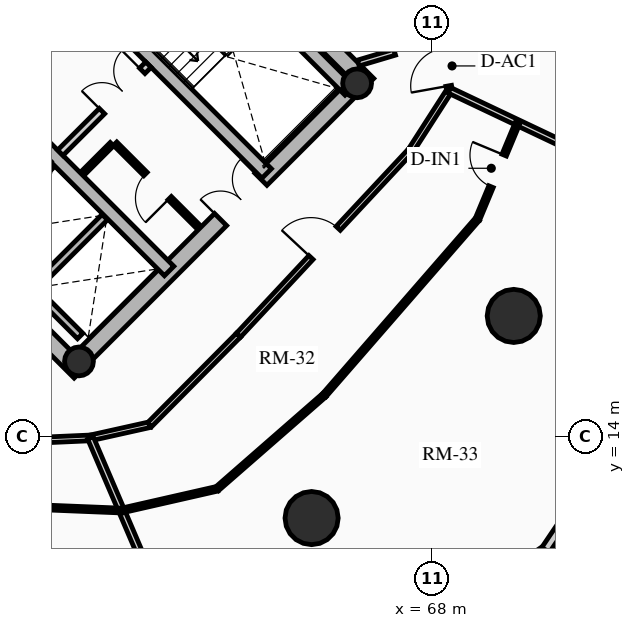
"""IFC4 building model, lengths in metres.
Left out: names, types, materials, properties, quantities, classifications, styles, units other than length and angle.
Written with IfcOpenShell. Run it as: python <this file> out.ifc"""

import sys

from ifc_helpers import new_model, si_unit, direction, frame, frame_2d, origin, origin_2d, place, context, subcontext, project, spatial, rectangle, circle, hollow_circle, extrude, source, transform, mapped, element, fill, save


model = new_model("IFC4")
c1 = context("Model", 3, precision=1e-05, world=origin(), true_north=direction((0.0, 1.0)))
c2 = subcontext(c1, "Body", "Model", "MODEL_VIEW")
j1 = project(units=[si_unit("LENGTHUNIT", "METRE"), si_unit("PLANEANGLEUNIT", "RADIAN")], contexts=[c1])
p1 = place(None, origin())
s1 = spatial("IfcSite", under=j1, at=p1, CompositionType="ELEMENT")
p2 = place(p1, origin())
s2 = spatial("IfcBuilding", under=s1, at=p2, CompositionType="ELEMENT")
p3 = place(p2, frame((0.0, 0.0, 105.07)))
s3 = spatial("IfcBuildingStorey", under=s2, at=p3, CompositionType="ELEMENT", Elevation=105.07)
for number, where, z_axis, x_axis in (
    (1, (58.737, 15.697, 0.0), (0.0, 0.0, 1.0), (-0.707, 0.707, 0.0)),
    (2, (66.303, 23.263, 0.0), (0.0, 0.0, 1.0), (-0.707, 0.707, 0.0)),
):
    element("IfcWall", number, at=place(p3, frame(where, z_axis=z_axis, x_axis=x_axis)), inside=s3, PredefinedType="SHEAR", context=c2, shape_type="SweptSolid", body=[
        extrude(rectangle(XDim=14.2, YDim=0.45, at=frame_2d((7.1, 0.0))), origin(), (0.0, 0.0, 1.0), 2.91),
    ])
p4 = place(p3, frame((58.578, 15.856, 0.0), z_axis=(0.0, 0.0, 1.0), x_axis=(0.707106781187, 0.707106781187, 0.0)))
e3 = element("IfcWall", 3, at=p4, inside=s3, PredefinedType="SHEAR", context=c2, shape_type="SweptSolid", body=[
    extrude(rectangle(XDim=10.7, YDim=0.45, at=frame_2d((5.35, 0.0))), origin(), (0.0, 0.0, 1.0), 2.91),
])
m1 = source(origin(), c2, "Body", "SweptSolid", [
    extrude(rectangle(XDim=1.5, YDim=2.02, at=frame_2d((0.75, 1.01))), frame((0.0, 0.235, 0.0), z_axis=(0.0, -1.0, 0.0), x_axis=(1.0, 0.0, 0.0)), (0.0, 0.0, 1.0), 0.47),
])
p5 = place(p4, frame((5.45, 0.0, 0.0)))
e4 = element("IfcOpeningElement", 4, at=p5, cuts=e3, PredefinedType="OPENING", context=c2, shape_type="MappedRepresentation", body=[
    mapped(m1, transform((0.0, 0.0, 0.0), x_axis=(1.0, 0.0, 0.0), y_axis=(0.0, 1.0, 0.0), z_axis=(0.0, 0.0, 1.0), scale=1.0)),
])
p6 = place(p3, frame((61.078, 18.355, 0.0), z_axis=(0.0, 0.0, 1.0), x_axis=(-0.707106781187, 0.707106781187, 0.0)))
e5 = element("IfcWall", 5, at=p6, inside=s3, PredefinedType="SHEAR", context=c2, shape_type="SweptSolid", body=[
    extrude(rectangle(XDim=13.75, YDim=0.35, at=frame_2d((6.875, 0.0))), origin(), (0.0, 0.0, 1.0), 2.91),
])
m2 = source(origin(), c2, "Body", "SweptSolid", [
    extrude(rectangle(XDim=1.1, YDim=2.015, at=frame_2d((0.55, 1.007))), frame((0.0, 0.185, 0.0), z_axis=(0.0, -1.0, 0.0), x_axis=(1.0, 0.0, 0.0)), (0.0, 0.0, 1.0), 0.37),
])
p7 = place(p6, frame((4.875, 0.0, 0.0)))
e6 = element("IfcOpeningElement", 6, at=p7, cuts=e5, PredefinedType="OPENING", context=c2, shape_type="MappedRepresentation", body=[
    mapped(m2, transform((0.0, 0.0, 0.0), x_axis=(1.0, 0.0, 0.0), y_axis=(0.0, 1.0, 0.0), z_axis=(0.0, 0.0, 1.0), scale=1.0)),
])
m3 = source(origin(), c2, "Body", "SweptSolid", [
    extrude(rectangle(XDim=1.15, YDim=2.02, at=frame_2d((0.575, 1.01))), frame((0.0, 0.185, 0.0), z_axis=(0.0, -1.0, 0.0), x_axis=(1.0, 0.0, 0.0)), (0.0, 0.0, 1.0), 0.37),
])
p8 = place(p6, frame((7.295, 0.0, 0.0)))
e7 = element("IfcOpeningElement", 7, at=p8, cuts=e5, PredefinedType="OPENING", context=c2, shape_type="MappedRepresentation", body=[
    mapped(m3, transform((0.0, 0.0, 0.0), x_axis=(1.0, 0.0, 0.0), y_axis=(0.0, 1.0, 0.0), z_axis=(0.0, 0.0, 1.0), scale=1.0)),
])
p9 = place(p3, frame((63.645, 20.922, 0.0), z_axis=(0.0, 0.0, 1.0), x_axis=(-0.707106781187, 0.707106781187, 0.0)))
e8 = element("IfcWall", 8, at=p9, inside=s3, PredefinedType="SHEAR", context=c2, shape_type="SweptSolid", body=[
    extrude(rectangle(XDim=13.75, YDim=0.35, at=frame_2d((6.875, 0.0))), origin(), (0.0, 0.0, 1.0), 2.91),
])
p10 = place(p9, frame((10.0, 0.0, 0.0)))
e9 = element("IfcOpeningElement", 9, at=p10, cuts=e8, PredefinedType="OPENING", context=c2, shape_type="MappedRepresentation", body=[
    mapped(m2, transform((0.0, 0.0, 0.0), x_axis=(1.0, 0.0, 0.0), y_axis=(0.0, 1.0, 0.0), z_axis=(0.0, 0.0, 1.0), scale=1.0)),
])
p11 = place(p9, frame((12.0, 0.0, 0.0)))
e10 = element("IfcOpeningElement", 10, at=p11, cuts=e8, PredefinedType="OPENING", context=c2, shape_type="MappedRepresentation", body=[
    mapped(m2, transform((0.0, 0.0, 0.0), x_axis=(1.0, 0.0, 0.0), y_axis=(0.0, 1.0, 0.0), z_axis=(0.0, 0.0, 1.0), scale=1.0)),
])
p12 = place(p9, frame((5.305, 0.0, 0.0)))
e11 = element("IfcOpeningElement", 11, at=p12, cuts=e8, PredefinedType="OPENING", context=c2, shape_type="MappedRepresentation", body=[
    mapped(m3, transform((0.0, 0.0, 0.0), x_axis=(1.0, 0.0, 0.0), y_axis=(0.0, 1.0, 0.0), z_axis=(0.0, 0.0, 1.0), scale=1.0)),
])
p13 = place(p3, frame((65.83, 23.107, 0.0), z_axis=(0.0, 0.0, 1.0), x_axis=(-0.707088616009, 0.707124945897, 0.0)))
e12 = element("IfcWall", 12, at=p13, inside=s3, PredefinedType="SHEAR", context=c2, shape_type="SweptSolid", body=[
    extrude(rectangle(XDim=6.72, YDim=0.35, at=frame_2d((3.36, 0.0))), origin(), (0.0, 0.0, 1.0), 2.91),
])
for number, where, z_axis, x_axis in (
    (13, (58.706, 15.976, 0.0), (0.0, 0.0, 1.0), (0.707, 0.707, 0.0)),
    (14, (66.024, 23.294, 0.0), (0.0, 0.0, 1.0), (0.707, 0.707, 0.0)),
):
    element("IfcColumn", number, at=place(p3, frame(where, z_axis=z_axis, x_axis=x_axis)), inside=s3, PredefinedType="COLUMN", context=c2, shape_type="SweptSolid", body=[
        extrude(hollow_circle(Radius=0.38, WallThickness=0.032, at=origin_2d()), origin(), (0.0, 0.0, 1.0), 2.91),
    ])
for number, where, z_axis, x_axis in (
    (15, (64.827, 11.854, 0.0), (0.0, 0.0, 1.0), (1.0, 0.0, 0.0)),
    (16, (70.146, 17.173, 0.0), (0.0, 0.0, 1.0), (1.0, 0.0, 0.0)),
):
    element("IfcColumn", number, at=place(p3, frame(where, z_axis=z_axis, x_axis=x_axis)), inside=s3, PredefinedType="USERDEFINED", context=c2, shape_type="SweptSolid", body=[
        extrude(circle(Radius=0.7, at=origin_2d()), origin(), (0.0, 0.0, 1.0), 2.91),
    ])
p14 = place(p3, frame((70.985, 11.015, 0.0), z_axis=(0.0, 0.0, 1.0), x_axis=(-0.828781148131, -0.559572880421, 0.0)))
e17 = element("IfcWall", 17, at=p14, inside=s3, PredefinedType="SOLIDWALL", context=c2, shape_type="SweptSolid", body=[
    extrude(rectangle(XDim=4.905, YDim=0.24, at=frame_2d((2.452, 0.0))), origin(), (0.0, 0.0, 1.0), 2.179),
])
p15 = place(p3, frame((73.729, 15.08, 0.0), z_axis=(0.0, 0.0, 1.0), x_axis=(-0.559572880421, -0.828781148131, 0.0)))
e18 = element("IfcWall", 18, at=p15, inside=s3, PredefinedType="SOLIDWALL", context=c2, shape_type="SweptSolid", body=[
    extrude(rectangle(XDim=4.905, YDim=0.24, at=frame_2d((2.452, 0.0))), origin(), (0.0, 0.0, 1.0), 2.179),
])
m4 = source(origin(), c2, "Body", "SweptSolid", [
    extrude(rectangle(XDim=2.2, YDim=1.35, at=frame_2d((1.1, 0.675))), frame((0.0, 0.13, 0.0), z_axis=(0.0, -1.0, 0.0), x_axis=(1.0, 0.0, 0.0)), (0.0, 0.0, 1.0), 0.26),
])
p16 = place(p15, frame((1.352, 0.0, 0.65)))
e19 = element("IfcOpeningElement", 19, at=p16, cuts=e18, PredefinedType="OPENING", context=c2, shape_type="MappedRepresentation", body=[
    mapped(m4, transform((0.0, 0.0, 0.0), x_axis=(1.0, 0.0, 0.0), y_axis=(0.0, 1.0, 0.0), z_axis=(0.0, 0.0, 1.0), scale=1.0)),
])
p17 = place(p3, frame((55.888, 19.069, 0.0), z_axis=(0.0, 0.0, 1.0), x_axis=(0.707106781187, 0.707106781187, 0.0)))
e20 = element("IfcWall", 20, at=p17, inside=s3, PredefinedType="SHEAR", context=c2, shape_type="SweptSolid", body=[
    extrude(rectangle(XDim=2.97, YDim=0.2, at=frame_2d((1.485, 0.0))), origin(), (0.0, 0.0, 1.0), 2.91),
])
p18 = place(p3, frame((57.284, 17.673, 0.0), z_axis=(0.0, 0.0, 1.0), x_axis=(0.707147878904, 0.70706568108, 0.0)))
e21 = element("IfcWall", 21, at=p18, inside=s3, PredefinedType="SHEAR", context=c2, shape_type="SweptSolid", body=[
    extrude(rectangle(XDim=2.97, YDim=0.2, at=frame_2d((1.485, 0.0))), origin(), (0.0, 0.0, 1.0), 2.91),
])
p19 = place(p3, frame((58.737, 16.644, 0.0), z_axis=(0.0, 0.0, 1.0), x_axis=(-0.707032117043, 0.707181437447, 0.0)))
e22 = element("IfcWall", 22, at=p19, inside=s3, PredefinedType="SHEAR", context=c2, shape_type="SweptSolid", body=[
    extrude(rectangle(XDim=1.635, YDim=0.2, at=frame_2d((0.817, 0.0))), origin(), (0.0, 0.0, 1.0), 2.91),
])
p20 = place(p3, frame((58.214, 21.467, 0.0), z_axis=(0.0, 0.0, 1.0), x_axis=(0.707106781187, 0.707106781187, 0.0)))
e23 = element("IfcWall", 23, at=p20, inside=s3, PredefinedType="PARTITIONING", context=c2, shape_type="SweptSolid", body=[
    extrude(rectangle(XDim=3.28, YDim=0.2, at=frame_2d((1.64, 0.0))), origin(), (0.0, 0.0, 1.0), 2.655),
])
m5 = source(origin(), c2, "Body", "SweptSolid", [
    extrude(rectangle(XDim=1.5, YDim=2.02, at=frame_2d((0.75, 1.01))), frame((0.0, 0.11, 0.0), z_axis=(0.0, -1.0, 0.0), x_axis=(1.0, 0.0, 0.0)), (0.0, 0.0, 1.0), 0.22),
])
p21 = place(p20, frame((1.55, 0.0, 0.0)))
e24 = element("IfcOpeningElement", 24, at=p21, cuts=e23, PredefinedType="OPENING", context=c2, shape_type="MappedRepresentation", body=[
    mapped(m5, transform((0.0, 0.0, 0.0), x_axis=(1.0, 0.0, 0.0), y_axis=(0.0, 1.0, 0.0), z_axis=(0.0, 0.0, 1.0), scale=1.0)),
])
p22 = place(p3, frame((61.835, 19.529, 0.0), z_axis=(0.0, 0.0, 1.0), x_axis=(-0.707146413884, 0.707067146267, 0.0)))
e25 = element("IfcWall", 25, at=p22, inside=s3, PredefinedType="PARTITIONING", context=c2, shape_type="SweptSolid", body=[
    extrude(rectangle(XDim=3.08, YDim=0.125, at=frame_2d((1.54, 0.0))), origin(), (0.0, 0.0, 1.0), 2.655),
])
m6 = source(origin(), c2, "Body", "SweptSolid", [
    extrude(rectangle(XDim=0.9, YDim=2.005, at=frame_2d((0.45, 1.002))), frame((0.0, 0.073, 0.0), z_axis=(0.0, -1.0, 0.0), x_axis=(1.0, 0.0, 0.0)), (0.0, 0.0, 1.0), 0.145),
])
p23 = place(p22, frame((1.05, 0.0, 0.0)))
e26 = element("IfcOpeningElement", 26, at=p23, cuts=e25, PredefinedType="OPENING", context=c2, shape_type="MappedRepresentation", body=[
    mapped(m6, transform((0.0, 0.0, 0.0), x_axis=(1.0, 0.0, 0.0), y_axis=(0.0, 1.0, 0.0), z_axis=(0.0, 0.0, 1.0), scale=1.0)),
])
p24 = place(p3, frame((58.794, 20.915, 0.0), z_axis=(0.0, 0.0, 1.0), x_axis=(0.707106781187, 0.707106781187, 0.0)))
e27 = element("IfcWall", 27, at=p24, inside=s3, PredefinedType="PARTITIONING", context=c2, shape_type="SweptSolid", body=[
    extrude(rectangle(XDim=1.1, YDim=0.125, at=frame_2d((0.55, 0.0))), origin(), (0.0, 0.0, 1.0), 2.655),
])
p25 = place(p3, frame((57.511, 13.897, 0.0), z_axis=(0.0, 0.0, 1.0), x_axis=(0.999024538494, 0.044158481476, 0.0)))
e28 = element("IfcWall", 28, at=p25, inside=s3, PredefinedType="PARTITIONING", context=c2, shape_type="SweptSolid", body=[
    extrude(rectangle(XDim=1.498, YDim=0.15, at=frame_2d((0.749, 0.0))), origin(), (0.0, 0.0, 1.0), 2.225),
])
p26 = place(p3, frame((59.008, 13.963, 0.0), z_axis=(0.0, 0.0, 1.0), x_axis=(0.976020856791, 0.21767702476, 0.0)))
e29 = element("IfcWall", 29, at=p26, inside=s3, PredefinedType="PARTITIONING", context=c2, shape_type="SweptSolid", body=[
    extrude(rectangle(XDim=1.593, YDim=0.15, at=frame_2d((0.796, 0.0))), origin(), (0.0, 0.0, 1.0), 2.225),
])
p27 = place(p3, frame((60.562, 14.31, 0.0), z_axis=(0.0, 0.0, 1.0), x_axis=(0.704566236161, 0.709638230975, 0.0)))
e30 = element("IfcWall", 30, at=p27, inside=s3, PredefinedType="PARTITIONING", context=c2, shape_type="SweptSolid", body=[
    extrude(rectangle(XDim=3.321, YDim=0.15, at=frame_2d((1.661, 0.0))), origin(), (0.0, 0.0, 1.0), 2.225),
])
p28 = place(p3, frame((62.903, 16.667, 0.0), z_axis=(0.0, 0.0, 1.0), x_axis=(0.682371947497, 0.731005147225, 0.0)))
e31 = element("IfcWall", 31, at=p28, inside=s3, PredefinedType="PARTITIONING", context=c2, shape_type="SweptSolid", body=[
    extrude(rectangle(XDim=6.642, YDim=0.15, at=frame_2d((3.321, 0.0))), origin(), (0.0, 0.0, 1.0), 2.225),
])
m7 = source(origin(), c2, "Body", "SweptSolid", [
    extrude(rectangle(XDim=1.05, YDim=2.015, at=frame_2d((0.525, 1.007))), frame((0.0, 0.085, 0.0), z_axis=(0.0, -1.0, 0.0), x_axis=(1.0, 0.0, 0.0)), (0.0, 0.0, 1.0), 0.17),
])
p29 = place(p28, frame((2.796, 0.0, 0.0)))
e32 = element("IfcOpeningElement", 32, at=p29, cuts=e31, PredefinedType="OPENING", context=c2, shape_type="MappedRepresentation", body=[
    mapped(m7, transform((0.0, 0.0, 0.0), x_axis=(1.0, 0.0, 0.0), y_axis=(0.0, 1.0, 0.0), z_axis=(0.0, 0.0, 1.0), scale=1.0)),
])
p30 = place(p3, frame((67.435, 21.521, 0.0), z_axis=(0.0, 0.0, 1.0), x_axis=(0.540777197838, 0.841165870859, 0.0)))
e33 = element("IfcWall", 33, at=p30, inside=s3, PredefinedType="PARTITIONING", context=c2, shape_type="SweptSolid", body=[
    extrude(rectangle(XDim=1.888, YDim=0.15, at=frame_2d((0.944, 0.0))), origin(), (0.0, 0.0, 1.0), 2.225),
])
p31 = place(p3, frame((68.456, 23.11, 0.0), z_axis=(0.0, 0.0, 1.0), x_axis=(-0.1772522795, 0.984165448191, 0.0)))
e34 = element("IfcWall", 34, at=p31, inside=s3, PredefinedType="PARTITIONING", context=c2, shape_type="SweptSolid", body=[
    extrude(rectangle(XDim=1.382, YDim=0.15, at=frame_2d((0.691, 0.0))), origin(), (0.0, 0.0, 1.0), 2.225),
])
m8 = source(origin(), c2, "Body", "SweptSolid", [
    extrude(rectangle(XDim=1.0, YDim=2.015, at=frame_2d((0.5, 1.007))), frame((0.0, 0.085, 0.0), z_axis=(0.0, -1.0, 0.0), x_axis=(1.0, 0.0, 0.0)), (0.0, 0.0, 1.0), 0.17),
])
p32 = place(p31, frame((0.12, 0.0, 0.0)))
e35 = element("IfcOpeningElement", 35, at=p32, cuts=e34, PredefinedType="OPENING", context=c2, shape_type="MappedRepresentation", body=[
    mapped(m8, transform((0.0, 0.0, 0.0), x_axis=(1.0, 0.0, 0.0), y_axis=(0.0, 1.0, 0.0), z_axis=(0.0, 0.0, 1.0), scale=1.0)),
])
p33 = place(p3, frame((59.008, 13.963, 0.0), z_axis=(0.0, 0.0, 1.0), x_axis=(0.393439207333, -0.919350635032, 0.0)))
e36 = element("IfcWall", 36, at=p33, inside=s3, PredefinedType="PARTITIONING", context=c2, shape_type="SweptSolid", body=[
    extrude(rectangle(XDim=7.427, YDim=0.16, at=frame_2d((3.713, 0.0))), origin(), (0.0, 0.0, 1.0), 2.179),
])
p34 = place(p3, frame((68.456, 23.11, 0.0), z_axis=(0.0, 0.0, 1.0), x_axis=(0.903539425667, -0.428504966442, 0.0)))
e37 = element("IfcWall", 37, at=p34, inside=s3, PredefinedType="PARTITIONING", context=c2, shape_type="SweptSolid", body=[
    extrude(rectangle(XDim=7.094, YDim=0.16, at=frame_2d((3.547, 0.0))), origin(), (0.0, 0.0, 1.0), 2.179),
])
p35 = place(p3, frame((66.056, 23.828, 0.0), z_axis=(0.0, 0.0, 1.0), x_axis=(0.958475403544, 0.285175210708, 0.0)))
e38 = element("IfcWall", 38, at=p35, inside=s3, PredefinedType="PARTITIONING", context=c2, shape_type="SweptSolid", body=[
    extrude(rectangle(XDim=2.248, YDim=0.16, at=frame_2d((1.124, 0.0))), origin(), (0.0, 0.0, 1.0), 2.225),
])
m9 = source(origin(), c2, "Body", "SweptSolid", [
    extrude(rectangle(XDim=1.05, YDim=2.015, at=frame_2d((0.525, 1.007))), frame((0.0, 0.09, 0.0), z_axis=(0.0, -1.0, 0.0), x_axis=(1.0, 0.0, 0.0)), (0.0, 0.0, 1.0), 0.18),
])
p36 = place(p35, frame((0.998, 0.0, 0.0)))
e39 = element("IfcOpeningElement", 39, at=p36, cuts=e38, PredefinedType="OPENING", context=c2, shape_type="MappedRepresentation", body=[
    mapped(m9, transform((0.0, 0.0, 0.0), x_axis=(1.0, 0.0, 0.0), y_axis=(0.0, 1.0, 0.0), z_axis=(0.0, 0.0, 1.0), scale=1.0)),
])
p37 = place(p3, frame((57.233, 12.156, 0.0), z_axis=(0.0, 0.0, 1.0), x_axis=(0.999181916557, -0.040441286156, 0.0)))
e40 = element("IfcWall", 40, at=p37, inside=s3, PredefinedType="PARTITIONING", context=c2, shape_type="SweptSolid", body=[
    extrude(rectangle(XDim=2.596, YDim=0.125, at=frame_2d((1.298, 0.0))), origin(), (0.0, 0.0, 1.0), 2.655),
])
p38 = place(p3, frame((59.826, 12.051, 0.0), z_axis=(0.0, 0.0, 1.0), x_axis=(0.975009915085, 0.222161350116, 0.0)))
e41 = element("IfcWall", 41, at=p38, inside=s3, PredefinedType="PARTITIONING", context=c2, shape_type="SweptSolid", body=[
    extrude(rectangle(XDim=2.578, YDim=0.125, at=frame_2d((1.289, 0.0))), origin(), (0.0, 0.0, 1.0), 2.225),
])
p39 = place(p3, frame((62.34, 12.624, 0.0), z_axis=(0.0, 0.0, 1.0), x_axis=(0.753169839919, 0.657826110941, 0.0)))
e42 = element("IfcWall", 42, at=p39, inside=s3, PredefinedType="PARTITIONING", context=c2, shape_type="SweptSolid", body=[
    extrude(rectangle(XDim=3.746, YDim=0.125, at=frame_2d((1.873, 0.0))), origin(), (0.0, 0.0, 1.0), 2.225),
])
p40 = place(p3, frame((65.162, 15.088, 0.0), z_axis=(0.0, 0.0, 1.0), x_axis=(0.656379509785, 0.754430871011, 0.0)))
e43 = element("IfcWall", 43, at=p40, inside=s3, PredefinedType="PARTITIONING", context=c2, shape_type="SweptSolid", body=[
    extrude(rectangle(XDim=6.14, YDim=0.125, at=frame_2d((3.07, 0.0))), origin(), (0.0, 0.0, 1.0), 2.225),
])
p41 = place(p3, frame((69.192, 19.72, 0.0), z_axis=(0.0, 0.0, 1.0), x_axis=(0.384899070029, 0.922958669655, 0.0)))
e44 = element("IfcWall", 44, at=p41, inside=s3, PredefinedType="PARTITIONING", context=c2, shape_type="SweptSolid", body=[
    extrude(rectangle(XDim=2.75, YDim=0.125, at=frame_2d((1.375, 0.0))), origin(), (0.0, 0.0, 1.0), 2.179),
])
p42 = place(p41, frame((0.925, 0.0, 0.0)))
e45 = element("IfcOpeningElement", 45, at=p42, cuts=e44, PredefinedType="OPENING", context=c2, shape_type="MappedRepresentation", body=[
    mapped(m6, transform((0.0, 0.0, 0.0), x_axis=(1.0, 0.0, 0.0), y_axis=(0.0, 1.0, 0.0), z_axis=(0.0, 0.0, 1.0), scale=1.0)),
])
m10 = source(origin(), c2, "Body", "SweptSolid", [
    extrude(rectangle(XDim=1.5, YDim=2.02, at=frame_2d((0.75, 1.01))), frame((0.0, 0.025, 0.0), z_axis=(0.0, -1.0, 0.0), x_axis=(1.0, 0.0, 0.0)), (0.0, 0.0, 1.0), 0.05),
])
p43 = place(p5, origin())
e46 = element("IfcDoor", 46, at=p43, inside=s3, OperationType="DOUBLE_DOOR_SINGLE_SWING", PredefinedType="DOOR", context=c2, shape_type="MappedRepresentation", body=[
    mapped(m10, transform((0.0, 0.0, 0.0), x_axis=(1.0, 0.0, 0.0), y_axis=(0.0, 1.0, 0.0), z_axis=(0.0, 0.0, 1.0), scale=1.0)),
])
fill(e4, e46)
p44 = place(p21, origin())
e47 = element("IfcDoor", 47, at=p44, inside=s3, OperationType="DOUBLE_DOOR_SINGLE_SWING", PredefinedType="DOOR", context=c2, shape_type="MappedRepresentation", body=[
    mapped(m10, transform((0.0, 0.0, 0.0), x_axis=(1.0, 0.0, 0.0), y_axis=(0.0, 1.0, 0.0), z_axis=(0.0, 0.0, 1.0), scale=1.0)),
])
fill(e24, e47)
m11 = source(origin(), c2, "Body", "SweptSolid", [
    extrude(rectangle(XDim=0.9, YDim=2.005, at=frame_2d((0.45, 1.002))), frame((0.0, 0.025, 0.0), z_axis=(0.0, -1.0, 0.0), x_axis=(1.0, 0.0, 0.0)), (0.0, 0.0, 1.0), 0.05),
])
p45 = place(p23, origin())
e48 = element("IfcDoor", 48, at=p45, inside=s3, OperationType="SINGLE_SWING_LEFT", PredefinedType="DOOR", context=c2, shape_type="MappedRepresentation", body=[
    mapped(m11, transform((0.0, 0.0, 0.0), x_axis=(1.0, 0.0, 0.0), y_axis=(0.0, 1.0, 0.0), z_axis=(0.0, 0.0, 1.0), scale=1.0)),
])
fill(e26, e48)
m12 = source(origin(), c2, "Body", "SweptSolid", [
    extrude(rectangle(XDim=1.05, YDim=2.015, at=frame_2d((0.525, 1.007))), frame((0.0, 0.025, 0.0), z_axis=(0.0, -1.0, 0.0), x_axis=(1.0, 0.0, 0.0)), (0.0, 0.0, 1.0), 0.05),
])
p46 = place(p36, origin())
e49 = element("IfcDoor", 49, at=p46, inside=s3, OperationType="SINGLE_SWING_LEFT", PredefinedType="DOOR", context=c2, shape_type="MappedRepresentation", body=[
    mapped(m12, transform((0.0, 0.0, 0.0), x_axis=(1.0, 0.0, 0.0), y_axis=(0.0, 1.0, 0.0), z_axis=(0.0, 0.0, 1.0), scale=1.0)),
])
fill(e39, e49)
p47 = place(p29, origin())
e50 = element("IfcDoor", 50, at=p47, inside=s3, OperationType="SINGLE_SWING_LEFT", PredefinedType="DOOR", context=c2, shape_type="MappedRepresentation", body=[
    mapped(m12, transform((0.0, 0.0, 0.0), x_axis=(1.0, 0.0, 0.0), y_axis=(0.0, 1.0, 0.0), z_axis=(0.0, 0.0, 1.0), scale=1.0)),
])
fill(e32, e50)
p48 = place(p42, origin())
e51 = element("IfcDoor", 51, at=p48, inside=s3, OperationType="SINGLE_SWING_RIGHT", PredefinedType="DOOR", context=c2, shape_type="MappedRepresentation", body=[
    mapped(m11, transform((0.0, 0.0, 0.0), x_axis=(1.0, 0.0, 0.0), y_axis=(0.0, 1.0, 0.0), z_axis=(0.0, 0.0, 1.0), scale=1.0)),
])
fill(e45, e51)
m13 = source(origin(), c2, "Body", "SweptSolid", [
    extrude(rectangle(XDim=1.0, YDim=2.015, at=frame_2d((0.5, 1.007))), frame((0.0, 0.025, 0.0), z_axis=(0.0, -1.0, 0.0), x_axis=(1.0, 0.0, 0.0)), (0.0, 0.0, 1.0), 0.05),
])
p49 = place(p32, origin())
e52 = element("IfcDoor", 52, at=p49, inside=s3, OperationType="SINGLE_SWING_LEFT", PredefinedType="DOOR", context=c2, shape_type="MappedRepresentation", body=[
    mapped(m13, transform((0.0, 0.0, 0.0), x_axis=(1.0, 0.0, 0.0), y_axis=(0.0, 1.0, 0.0), z_axis=(0.0, 0.0, 1.0), scale=1.0)),
])
fill(e35, e52)
save(model, sys.argv[1])
